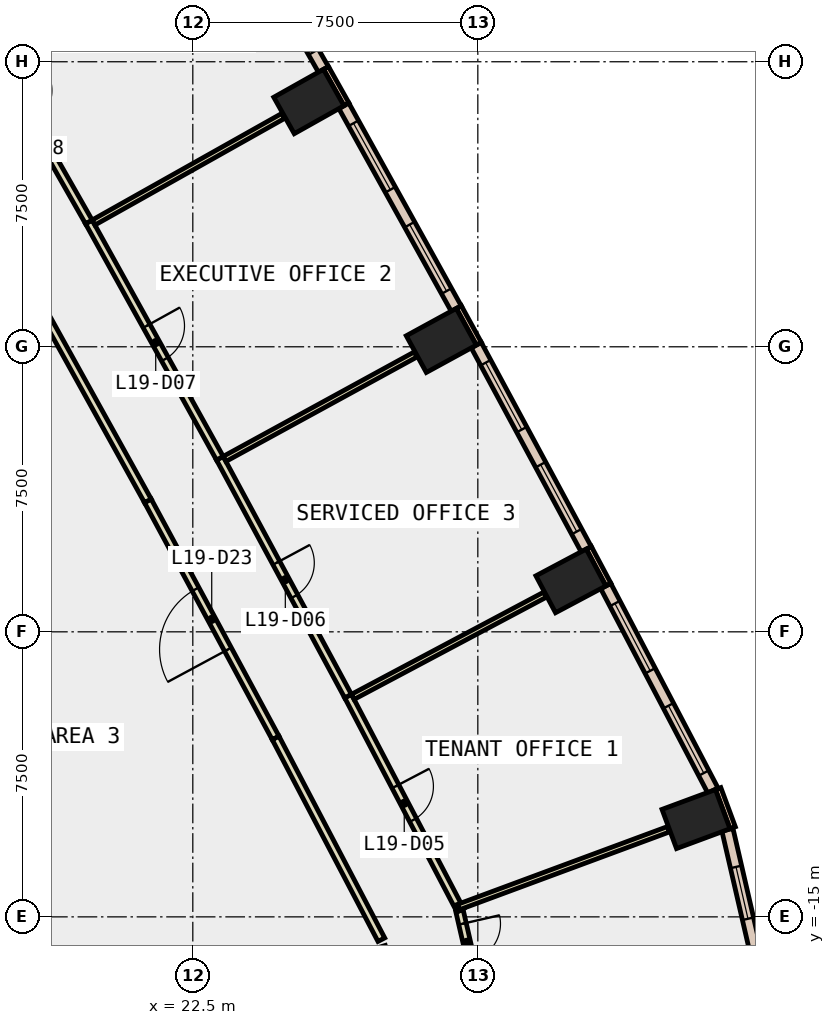
"""IFC4 building model, lengths in metres.
Left out: names, types, materials, properties, quantities, classifications, styles, units other than length and angle.
Written with IfcOpenShell. Run it as: python <this file> out.ifc"""

import sys

from ifc_helpers import new_model, si_unit, direction, frame, frame_2d, origin, origin_2d, place, context, subcontext, project, spatial, rectangle, extrude, element, fill, save


model = new_model("IFC4")
c1 = context("Model", 3, precision=1e-05, world=origin(), true_north=direction((0.0, 1.0)))
c2 = subcontext(c1, "Body", "Model", "MODEL_VIEW")
j1 = project(units=[si_unit("LENGTHUNIT", "METRE"), si_unit("PLANEANGLEUNIT", "RADIAN")], contexts=[c1])
p1 = place(None, origin())
s1 = spatial("IfcSite", under=j1, at=p1, CompositionType="ELEMENT")
p2 = place(p1, origin())
s2 = spatial("IfcBuilding", under=s1, at=p2, CompositionType="ELEMENT")
p3 = place(p2, frame((0.0, 0.0, 90.8)))
s3 = spatial("IfcBuildingStorey", under=s2, at=p3, CompositionType="ELEMENT", Elevation=90.8)
for number, where, z_axis, x_axis in (
    (1, (35.741, -12.427, -0.4), (0.0, 0.0, 1.0), (-0.347, 0.938, 0.0)),
    (2, (32.449, -6.16, -0.4), (0.0, 0.0, 1.0), (-0.469, 0.883, 0.0)),
    (3, (29.039, 0.167, -0.4), (0.0, 0.0, 1.0), (-0.48, 0.877, 0.0)),
    (4, (25.554, 6.454, -0.4), (0.0, 0.0, 1.0), (-0.49, 0.872, 0.0)),
):
    element("IfcColumn", number, at=place(p3, frame(where, z_axis=z_axis, x_axis=x_axis)), inside=s3, PredefinedType="COLUMN", context=c2, shape_type="SweptSolid", body=[
        extrude(rectangle(XDim=1.1, YDim=1.5, at=origin_2d()), origin(), (0.0, 0.0, 1.0), 4.2),
    ])
p4 = place(p3, frame((36.706, -12.656, 0.0), z_axis=(0.0, 0.0, 1.0), x_axis=(-0.347205967468, 0.937788897436, 0.0)))
e5 = element("IfcWall", 5, at=p4, inside=s3, PredefinedType="STANDARD", context=c2, shape_type="SweptSolid", body=[
    extrude(rectangle(XDim=1.1, YDim=0.15, at=frame_2d((0.55, 0.0))), origin(), (0.0, 0.0, 1.0), 3.8),
])
p5 = place(p3, frame((33.436, -6.259, 0.0), z_axis=(0.0, 0.0, 1.0), x_axis=(-0.469366248657, 0.883003581319, 0.0)))
e6 = element("IfcWall", 6, at=p5, inside=s3, PredefinedType="STANDARD", context=c2, shape_type="SweptSolid", body=[
    extrude(rectangle(XDim=1.1, YDim=0.15, at=frame_2d((0.55, 0.0))), origin(), (0.0, 0.0, 1.0), 3.8),
])
p6 = place(p3, frame((30.027, 0.08, 0.0), z_axis=(0.0, 0.0, 1.0), x_axis=(-0.479737645119, 0.877411985247, 0.0)))
e7 = element("IfcWall", 7, at=p6, inside=s3, PredefinedType="STANDARD", context=c2, shape_type="SweptSolid", body=[
    extrude(rectangle(XDim=1.101, YDim=0.15, at=frame_2d((0.55, 0.0))), origin(), (0.0, 0.0, 1.0), 3.8),
])
p7 = place(p3, frame((26.543, 6.379, 0.0), z_axis=(0.0, 0.0, 1.0), x_axis=(-0.490008344094, 0.871717742574, 0.0)))
e8 = element("IfcWall", 8, at=p7, inside=s3, PredefinedType="STANDARD", context=c2, shape_type="SweptSolid", body=[
    extrude(rectangle(XDim=1.1, YDim=0.15, at=frame_2d((0.55, 0.0))), origin(), (0.0, 0.0, 1.0), 3.8),
])
p8 = place(p3, frame((37.335, -16.029, 0.0), z_axis=(0.0, 0.0, 1.0), x_axis=(-0.224859506699, 0.974391195695, 0.0)))
e9 = element("IfcWall", 9, at=p8, inside=s3, PredefinedType="STANDARD", context=c2, shape_type="SweptSolid", body=[
    extrude(rectangle(XDim=3.41, YDim=0.3, at=frame_2d((1.705, 0.0))), origin(), (0.0, 0.0, 1.0), 3.8),
])
p9 = place(p8, frame((1.005, 0.0, 0.9)))
e10 = element("IfcOpeningElement", 10, at=p9, cuts=e9, PredefinedType="OPENING", context=c2, shape_type="SweptSolid", body=[
    extrude(rectangle(XDim=1.4, YDim=2.6, at=frame_2d((0.7, 1.3))), frame((0.0, 0.16, 0.0), z_axis=(0.0, -1.0, 0.0), x_axis=(1.0, 0.0, 0.0)), (0.0, 0.0, 1.0), 0.32),
])
p10 = place(p3, frame((36.186, -11.676, 0.0), z_axis=(0.0, 0.0, 1.0), x_axis=(-0.464187178015, 0.885737130173, 0.0)))
e11 = element("IfcWall", 11, at=p10, inside=s3, PredefinedType="STANDARD", context=c2, shape_type="SweptSolid", body=[
    extrude(rectangle(XDim=6.075, YDim=0.3, at=frame_2d((3.038, 0.0))), origin(), (0.0, 0.0, 1.0), 3.8),
])
p11 = place(p10, frame((0.519, 0.0, 0.9)))
e12 = element("IfcOpeningElement", 12, at=p11, cuts=e11, PredefinedType="OPENING", context=c2, shape_type="SweptSolid", body=[
    extrude(rectangle(XDim=2.0, YDim=2.6, at=frame_2d((1.0, 1.3))), frame((0.0, 0.16, 0.0), z_axis=(0.0, -1.0, 0.0), x_axis=(1.0, 0.0, 0.0)), (0.0, 0.0, 1.0), 0.32),
])
p12 = place(p10, frame((3.556, 0.0, 0.9)))
e13 = element("IfcOpeningElement", 13, at=p12, cuts=e11, PredefinedType="OPENING", context=c2, shape_type="SweptSolid", body=[
    extrude(rectangle(XDim=2.0, YDim=2.6, at=frame_2d((1.0, 1.3))), frame((0.0, 0.16, 0.0), z_axis=(0.0, -1.0, 0.0), x_axis=(1.0, 0.0, 0.0)), (0.0, 0.0, 1.0), 0.32),
])
p13 = place(p3, frame((32.851, -5.325, 0.0), z_axis=(0.0, 0.0, 1.0), x_axis=(-0.474369552216, 0.880325807829, 0.0)))
e14 = element("IfcWall", 14, at=p13, inside=s3, PredefinedType="STANDARD", context=c2, shape_type="SweptSolid", body=[
    extrude(rectangle(XDim=6.099, YDim=0.3, at=frame_2d((3.049, 0.0))), origin(), (0.0, 0.0, 1.0), 3.8),
])
p14 = place(p13, frame((0.525, 0.0, 0.9)))
e15 = element("IfcOpeningElement", 15, at=p14, cuts=e14, PredefinedType="OPENING", context=c2, shape_type="SweptSolid", body=[
    extrude(rectangle(XDim=2.0, YDim=2.6, at=frame_2d((1.0, 1.3))), frame((0.0, 0.16, 0.0), z_axis=(0.0, -1.0, 0.0), x_axis=(1.0, 0.0, 0.0)), (0.0, 0.0, 1.0), 0.32),
])
p15 = place(p13, frame((3.574, 0.0, 0.9)))
e16 = element("IfcOpeningElement", 16, at=p15, cuts=e14, PredefinedType="OPENING", context=c2, shape_type="SweptSolid", body=[
    extrude(rectangle(XDim=2.0, YDim=2.6, at=frame_2d((1.0, 1.3))), frame((0.0, 0.16, 0.0), z_axis=(0.0, -1.0, 0.0), x_axis=(1.0, 0.0, 0.0)), (0.0, 0.0, 1.0), 0.32),
])
p16 = place(p3, frame((29.431, 1.007, 0.0), z_axis=(0.0, 0.0, 1.0), x_axis=(-0.484823579315, 0.874611969356, 0.0)))
e17 = element("IfcWall", 17, at=p16, inside=s3, PredefinedType="STANDARD", context=c2, shape_type="SweptSolid", body=[
    extrude(rectangle(XDim=6.099, YDim=0.3, at=frame_2d((3.049, 0.0))), origin(), (0.0, 0.0, 1.0), 3.8),
])
p17 = place(p16, frame((0.525, 0.0, 0.9)))
e18 = element("IfcOpeningElement", 18, at=p17, cuts=e17, PredefinedType="OPENING", context=c2, shape_type="SweptSolid", body=[
    extrude(rectangle(XDim=2.0, YDim=2.6, at=frame_2d((1.0, 1.3))), frame((0.0, 0.16, 0.0), z_axis=(0.0, -1.0, 0.0), x_axis=(1.0, 0.0, 0.0)), (0.0, 0.0, 1.0), 0.32),
])
p18 = place(p16, frame((3.574, 0.0, 0.9)))
e19 = element("IfcOpeningElement", 19, at=p18, cuts=e17, PredefinedType="OPENING", context=c2, shape_type="SweptSolid", body=[
    extrude(rectangle(XDim=2.0, YDim=2.6, at=frame_2d((1.0, 1.3))), frame((0.0, 0.16, 0.0), z_axis=(0.0, -1.0, 0.0), x_axis=(1.0, 0.0, 0.0)), (0.0, 0.0, 1.0), 0.32),
])
p19 = place(p3, frame((25.936, 7.299, 0.0), z_axis=(0.0, 0.0, 1.0), x_axis=(-0.49492259535, 0.868937065967, 0.0)))
e20 = element("IfcWall", 20, at=p19, inside=s3, PredefinedType="STANDARD", context=c2, shape_type="SweptSolid", body=[
    extrude(rectangle(XDim=6.098, YDim=0.3, at=frame_2d((3.049, 0.0))), origin(), (0.0, 0.0, 1.0), 3.8),
])
p20 = place(p19, frame((0.525, 0.0, 0.9)))
e21 = element("IfcOpeningElement", 21, at=p20, cuts=e20, PredefinedType="OPENING", context=c2, shape_type="SweptSolid", body=[
    extrude(rectangle(XDim=2.0, YDim=2.6, at=frame_2d((1.0, 1.3))), frame((0.0, 0.16, 0.0), z_axis=(0.0, -1.0, 0.0), x_axis=(1.0, 0.0, 0.0)), (0.0, 0.0, 1.0), 0.32),
])
p21 = place(p19, frame((3.574, 0.0, 0.9)))
e22 = element("IfcOpeningElement", 22, at=p21, cuts=e20, PredefinedType="OPENING", context=c2, shape_type="SweptSolid", body=[
    extrude(rectangle(XDim=2.0, YDim=2.6, at=frame_2d((1.0, 1.3))), frame((0.0, 0.16, 0.0), z_axis=(0.0, -1.0, 0.0), x_axis=(1.0, 0.0, 0.0)), (0.0, 0.0, 1.0), 0.32),
])
p22 = place(p3, frame((27.461, -15.6, 0.0), z_axis=(0.0, 0.0, 1.0), x_axis=(-0.464203280494, 0.885728691179, 0.0)))
e23 = element("IfcWall", 23, at=p22, inside=s3, PredefinedType="PARTITIONING", context=c2, shape_type="SweptSolid", body=[
    extrude(rectangle(XDim=5.995, YDim=0.2, at=frame_2d((2.998, 0.0))), origin(), (0.0, 0.0, 1.0), 3.8),
])
p23 = place(p3, frame((24.678, -10.29, 0.0), z_axis=(0.0, 0.0, 1.0), x_axis=(-0.474391588657, 0.880313932987, 0.0)))
e24 = element("IfcWall", 24, at=p23, inside=s3, PredefinedType="PARTITIONING", context=c2, shape_type="SweptSolid", body=[
    extrude(rectangle(XDim=7.085, YDim=0.2, at=frame_2d((3.542, 0.0))), origin(), (0.0, 0.0, 1.0), 3.8),
])
p24 = place(p23, frame((2.642, 0.0, 0.0)))
e25 = element("IfcOpeningElement", 25, at=p24, cuts=e24, PredefinedType="OPENING", context=c2, shape_type="SweptSolid", body=[
    extrude(rectangle(XDim=1.8, YDim=2.1, at=frame_2d((0.9, 1.05))), frame((0.0, 0.11, 0.0), z_axis=(0.0, -1.0, 0.0), x_axis=(1.0, 0.0, 0.0)), (0.0, 0.0, 1.0), 0.22),
])
p25 = place(p3, frame((21.317, -4.053, 0.0), z_axis=(0.0, 0.0, 1.0), x_axis=(-0.484816829319, 0.874615711046, 0.0)))
e26 = element("IfcWall", 26, at=p25, inside=s3, PredefinedType="PARTITIONING", context=c2, shape_type="SweptSolid", body=[
    extrude(rectangle(XDim=6.827, YDim=0.2, at=frame_2d((3.414, 0.0))), origin(), (0.0, 0.0, 1.0), 3.8),
])
p26 = place(p3, frame((29.517, -14.838, 0.0), z_axis=(0.0, 0.0, 1.0), x_axis=(0.224316169854, -0.974516421587, 0.0)))
e27 = element("IfcWall", 27, at=p26, inside=s3, PredefinedType="PARTITIONING", context=c2, shape_type="SweptSolid", body=[
    extrude(rectangle(XDim=1.707, YDim=0.2, at=frame_2d((0.853, 0.0))), origin(), (0.0, 0.0, 1.0), 3.8),
])
p27 = place(p26, frame((0.353, 0.0, 0.0)))
e28 = element("IfcOpeningElement", 28, at=p27, cuts=e27, PredefinedType="OPENING", context=c2, shape_type="SweptSolid", body=[
    extrude(rectangle(XDim=1.0, YDim=2.1, at=frame_2d((0.5, 1.05))), frame((0.0, 0.11, 0.0), z_axis=(0.0, -1.0, 0.0), x_axis=(1.0, 0.0, 0.0)), (0.0, 0.0, 1.0), 0.22),
])
p28 = place(p3, frame((26.586, -9.191, 0.0), z_axis=(0.0, 0.0, 1.0), x_axis=(0.46422194761, -0.885718907643, 0.0)))
e29 = element("IfcWall", 29, at=p28, inside=s3, PredefinedType="PARTITIONING", context=c2, shape_type="SweptSolid", body=[
    extrude(rectangle(XDim=6.366, YDim=0.2, at=frame_2d((3.183, 0.0))), origin(), (0.0, 0.0, 1.0), 3.8),
])
p29 = place(p28, frame((2.683, 0.0, 0.0)))
e30 = element("IfcOpeningElement", 30, at=p29, cuts=e29, PredefinedType="OPENING", context=c2, shape_type="SweptSolid", body=[
    extrude(rectangle(XDim=1.0, YDim=2.1, at=frame_2d((0.5, 1.05))), frame((0.0, 0.11, 0.0), z_axis=(0.0, -1.0, 0.0), x_axis=(1.0, 0.0, 0.0)), (0.0, 0.0, 1.0), 0.22),
])
p30 = place(p3, frame((23.212, -2.932, 0.0), z_axis=(0.0, 0.0, 1.0), x_axis=(0.474404892994, -0.880306763295, 0.0)))
e31 = element("IfcWall", 31, at=p30, inside=s3, PredefinedType="PARTITIONING", context=c2, shape_type="SweptSolid", body=[
    extrude(rectangle(XDim=7.11, YDim=0.2, at=frame_2d((3.555, 0.0))), origin(), (0.0, 0.0, 1.0), 3.8),
])
p31 = place(p30, frame((3.13, 0.0, 0.0)))
e32 = element("IfcOpeningElement", 32, at=p31, cuts=e31, PredefinedType="OPENING", context=c2, shape_type="SweptSolid", body=[
    extrude(rectangle(XDim=1.0, YDim=2.1, at=frame_2d((0.5, 1.05))), frame((0.0, 0.11, 0.0), z_axis=(0.0, -1.0, 0.0), x_axis=(1.0, 0.0, 0.0)), (0.0, 0.0, 1.0), 0.22),
])
p32 = place(p3, frame((19.764, 3.286, 0.0), z_axis=(0.0, 0.0, 1.0), x_axis=(0.484858403734, -0.874592664232, 0.0)))
e33 = element("IfcWall", 33, at=p32, inside=s3, PredefinedType="PARTITIONING", context=c2, shape_type="SweptSolid", body=[
    extrude(rectangle(XDim=7.109, YDim=0.2, at=frame_2d((3.555, 0.0))), origin(), (0.0, 0.0, 1.0), 3.8),
])
p33 = place(p32, frame((3.13, 0.0, 0.0)))
e34 = element("IfcOpeningElement", 34, at=p33, cuts=e33, PredefinedType="OPENING", context=c2, shape_type="SweptSolid", body=[
    extrude(rectangle(XDim=1.0, YDim=2.1, at=frame_2d((0.5, 1.05))), frame((0.0, 0.11, 0.0), z_axis=(0.0, -1.0, 0.0), x_axis=(1.0, 0.0, 0.0)), (0.0, 0.0, 1.0), 0.22),
])
p34 = place(p3, frame((16.243, 9.465, 0.0), z_axis=(0.0, 0.0, 1.0), x_axis=(0.495081262009, -0.868846674625, 0.0)))
e35 = element("IfcWall", 35, at=p34, inside=s3, PredefinedType="PARTITIONING", context=c2, shape_type="SweptSolid", body=[
    extrude(rectangle(XDim=7.112, YDim=0.2, at=frame_2d((3.556, 0.0))), origin(), (0.0, 0.0, 1.0), 3.8),
])
p35 = place(p34, frame((3.131, 0.0, 0.0)))
e36 = element("IfcOpeningElement", 36, at=p35, cuts=e35, PredefinedType="OPENING", context=c2, shape_type="SweptSolid", body=[
    extrude(rectangle(XDim=1.0, YDim=2.1, at=frame_2d((0.5, 1.05))), frame((0.0, 0.11, 0.0), z_axis=(0.0, -1.0, 0.0), x_axis=(1.0, 0.0, 0.0)), (0.0, 0.0, 1.0), 0.22),
])
p36 = place(p3, frame((29.494, -14.741, 0.0), z_axis=(0.0, 0.0, 1.0), x_axis=(0.937719767819, 0.347392626636, 0.0)))
e37 = element("IfcWall", 37, at=p36, inside=s3, PredefinedType="PARTITIONING", context=c2, shape_type="SweptSolid", body=[
    extrude(rectangle(XDim=5.892, YDim=0.15, at=frame_2d((2.946, 0.0))), origin(), (0.0, 0.0, 1.0), 3.8),
])
p37 = place(p3, frame((26.709, -9.211, 0.0), z_axis=(0.0, 0.0, 1.0), x_axis=(0.883057238515, 0.46926529118, 0.0)))
e38 = element("IfcWall", 38, at=p37, inside=s3, PredefinedType="PARTITIONING", context=c2, shape_type="SweptSolid", body=[
    extrude(rectangle(XDim=5.73, YDim=0.15, at=frame_2d((2.865, 0.0))), origin(), (0.0, 0.0, 1.0), 3.8),
])
p38 = place(p3, frame((23.336, -2.95, 0.0), z_axis=(0.0, 0.0, 1.0), x_axis=(0.877455496162, 0.479658057637, 0.0)))
e39 = element("IfcWall", 39, at=p38, inside=s3, PredefinedType="PARTITIONING", context=c2, shape_type="SweptSolid", body=[
    extrude(rectangle(XDim=5.729, YDim=0.15, at=frame_2d((2.865, 0.0))), origin(), (0.0, 0.0, 1.0), 3.8),
])
p39 = place(p3, frame((19.888, 3.27, 0.0), z_axis=(0.0, 0.0, 1.0), x_axis=(0.871789386467, 0.489880868828, 0.0)))
e40 = element("IfcWall", 40, at=p39, inside=s3, PredefinedType="PARTITIONING", context=c2, shape_type="SweptSolid", body=[
    extrude(rectangle(XDim=5.73, YDim=0.15, at=frame_2d((2.865, 0.0))), origin(), (0.0, 0.0, 1.0), 3.8),
])
p40 = place(p9, origin())
e41 = element("IfcWindow", 41, at=p40, inside=s3, PartitioningType="SINGLE_PANEL", PredefinedType="WINDOW", context=c2, shape_type="SweptSolid", body=[
    extrude(rectangle(XDim=1.4, YDim=2.6, at=frame_2d((0.7, 1.3))), frame((0.0, 0.03, 0.0), z_axis=(0.0, -1.0, 0.0), x_axis=(1.0, 0.0, 0.0)), (0.0, 0.0, 1.0), 0.06),
])
fill(e10, e41)
p41 = place(p11, origin())
e42 = element("IfcWindow", 42, at=p41, inside=s3, PartitioningType="SINGLE_PANEL", PredefinedType="WINDOW", context=c2, shape_type="SweptSolid", body=[
    extrude(rectangle(XDim=2.0, YDim=2.6, at=frame_2d((1.0, 1.3))), frame((0.0, 0.03, 0.0), z_axis=(0.0, -1.0, 0.0), x_axis=(1.0, 0.0, 0.0)), (0.0, 0.0, 1.0), 0.06),
])
fill(e12, e42)
p42 = place(p12, origin())
e43 = element("IfcWindow", 43, at=p42, inside=s3, PartitioningType="SINGLE_PANEL", PredefinedType="WINDOW", context=c2, shape_type="SweptSolid", body=[
    extrude(rectangle(XDim=2.0, YDim=2.6, at=frame_2d((1.0, 1.3))), frame((0.0, 0.03, 0.0), z_axis=(0.0, -1.0, 0.0), x_axis=(1.0, 0.0, 0.0)), (0.0, 0.0, 1.0), 0.06),
])
fill(e13, e43)
p43 = place(p14, origin())
e44 = element("IfcWindow", 44, at=p43, inside=s3, PartitioningType="SINGLE_PANEL", PredefinedType="WINDOW", context=c2, shape_type="SweptSolid", body=[
    extrude(rectangle(XDim=2.0, YDim=2.6, at=frame_2d((1.0, 1.3))), frame((0.0, 0.03, 0.0), z_axis=(0.0, -1.0, 0.0), x_axis=(1.0, 0.0, 0.0)), (0.0, 0.0, 1.0), 0.06),
])
fill(e15, e44)
p44 = place(p15, origin())
e45 = element("IfcWindow", 45, at=p44, inside=s3, PartitioningType="SINGLE_PANEL", PredefinedType="WINDOW", context=c2, shape_type="SweptSolid", body=[
    extrude(rectangle(XDim=2.0, YDim=2.6, at=frame_2d((1.0, 1.3))), frame((0.0, 0.03, 0.0), z_axis=(0.0, -1.0, 0.0), x_axis=(1.0, 0.0, 0.0)), (0.0, 0.0, 1.0), 0.06),
])
fill(e16, e45)
p45 = place(p17, origin())
e46 = element("IfcWindow", 46, at=p45, inside=s3, PartitioningType="SINGLE_PANEL", PredefinedType="WINDOW", context=c2, shape_type="SweptSolid", body=[
    extrude(rectangle(XDim=2.0, YDim=2.6, at=frame_2d((1.0, 1.3))), frame((0.0, 0.03, 0.0), z_axis=(0.0, -1.0, 0.0), x_axis=(1.0, 0.0, 0.0)), (0.0, 0.0, 1.0), 0.06),
])
fill(e18, e46)
p46 = place(p18, origin())
e47 = element("IfcWindow", 47, at=p46, inside=s3, PartitioningType="SINGLE_PANEL", PredefinedType="WINDOW", context=c2, shape_type="SweptSolid", body=[
    extrude(rectangle(XDim=2.0, YDim=2.6, at=frame_2d((1.0, 1.3))), frame((0.0, 0.03, 0.0), z_axis=(0.0, -1.0, 0.0), x_axis=(1.0, 0.0, 0.0)), (0.0, 0.0, 1.0), 0.06),
])
fill(e19, e47)
p47 = place(p20, origin())
e48 = element("IfcWindow", 48, at=p47, inside=s3, PartitioningType="SINGLE_PANEL", PredefinedType="WINDOW", context=c2, shape_type="SweptSolid", body=[
    extrude(rectangle(XDim=2.0, YDim=2.6, at=frame_2d((1.0, 1.3))), frame((0.0, 0.03, 0.0), z_axis=(0.0, -1.0, 0.0), x_axis=(1.0, 0.0, 0.0)), (0.0, 0.0, 1.0), 0.06),
])
fill(e21, e48)
p48 = place(p27, origin())
e49 = element("IfcDoor", 49, at=p48, inside=s3, OperationType="SINGLE_SWING_RIGHT", PredefinedType="DOOR", context=c2, shape_type="SweptSolid", body=[
    extrude(rectangle(XDim=1.0, YDim=2.1, at=frame_2d((0.5, 1.05))), frame((0.0, 0.025, 0.0), z_axis=(0.0, -1.0, 0.0), x_axis=(1.0, 0.0, 0.0)), (0.0, 0.0, 1.0), 0.05),
])
fill(e28, e49)
p49 = place(p29, origin())
e50 = element("IfcDoor", 50, at=p49, inside=s3, OperationType="SINGLE_SWING_LEFT", PredefinedType="DOOR", context=c2, shape_type="SweptSolid", body=[
    extrude(rectangle(XDim=1.0, YDim=2.1, at=frame_2d((0.5, 1.05))), frame((0.0, 0.025, 0.0), z_axis=(0.0, -1.0, 0.0), x_axis=(1.0, 0.0, 0.0)), (0.0, 0.0, 1.0), 0.05),
])
fill(e30, e50)
p50 = place(p31, origin())
e51 = element("IfcDoor", 51, at=p50, inside=s3, OperationType="SINGLE_SWING_LEFT", PredefinedType="DOOR", context=c2, shape_type="SweptSolid", body=[
    extrude(rectangle(XDim=1.0, YDim=2.1, at=frame_2d((0.5, 1.05))), frame((0.0, 0.025, 0.0), z_axis=(0.0, -1.0, 0.0), x_axis=(1.0, 0.0, 0.0)), (0.0, 0.0, 1.0), 0.05),
])
fill(e32, e51)
p51 = place(p33, origin())
e52 = element("IfcDoor", 52, at=p51, inside=s3, OperationType="SINGLE_SWING_LEFT", PredefinedType="DOOR", context=c2, shape_type="SweptSolid", body=[
    extrude(rectangle(XDim=1.0, YDim=2.1, at=frame_2d((0.5, 1.05))), frame((0.0, 0.025, 0.0), z_axis=(0.0, -1.0, 0.0), x_axis=(1.0, 0.0, 0.0)), (0.0, 0.0, 1.0), 0.05),
])
fill(e34, e52)
p52 = place(p24, origin())
e53 = element("IfcDoor", 53, at=p52, inside=s3, OperationType="DOUBLE_DOOR_SINGLE_SWING", PredefinedType="DOOR", context=c2, shape_type="SweptSolid", body=[
    extrude(rectangle(XDim=1.8, YDim=2.1, at=frame_2d((0.9, 1.05))), frame((0.0, 0.025, 0.0), z_axis=(0.0, -1.0, 0.0), x_axis=(1.0, 0.0, 0.0)), (0.0, 0.0, 1.0), 0.05),
])
fill(e25, e53)
save(model, sys.argv[1])
